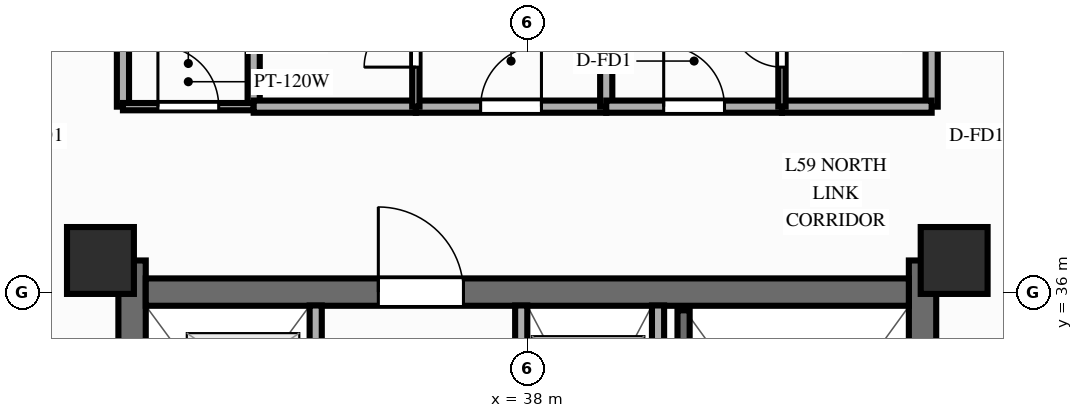
"""IFC4 building model, lengths in metres.
Left out: names, types, materials, properties, quantities, classifications, styles, units other than length and angle.
Written with IfcOpenShell. Run it as: python <this file> out.ifc"""

import sys

from ifc_helpers import new_model, si_unit, direction, frame, frame_2d, origin, origin_2d, place, context, subcontext, project, spatial, rectangle, extrude, source, transform, mapped, element, fill, save


model = new_model("IFC4")
c1 = context("Model", 3, precision=1e-05, world=origin(), true_north=direction((0.0, 1.0)))
c2 = subcontext(c1, "Body", "Model", "MODEL_VIEW")
j1 = project(units=[si_unit("LENGTHUNIT", "METRE"), si_unit("PLANEANGLEUNIT", "RADIAN")], contexts=[c1])
p1 = place(None, origin())
s1 = spatial("IfcSite", under=j1, at=p1, CompositionType="ELEMENT")
p2 = place(p1, origin())
s2 = spatial("IfcBuilding", under=s1, at=p2, CompositionType="ELEMENT")
p3 = place(p2, frame((0.0, 0.0, 189.7)))
s3 = spatial("IfcBuildingStorey", under=s2, at=p3, CompositionType="ELEMENT", Elevation=189.7)
p4 = place(p3, frame((31.5, 17.48, 0.0), z_axis=(0.0, 0.0, 1.0), x_axis=(0.0, 1.0, 0.0)))
e1 = element("IfcWall", 1, at=p4, inside=s3, PredefinedType="SHEAR", context=c2, shape_type="SweptSolid", body=[
    extrude(rectangle(XDim=19.04, YDim=0.45, at=frame_2d((9.52, 0.0))), origin(), (0.0, 0.0, 1.0), 3.0),
])
p5 = place(p4, frame((6.32, 0.0, 0.0)))
e2 = element("IfcOpeningElement", 2, at=p5, cuts=e1, PredefinedType="OPENING", context=c2, shape_type="SweptSolid", body=[
    extrude(rectangle(XDim=1.1, YDim=2.15, at=frame_2d((0.55, 1.075))), frame((0.0, 0.237, 0.0), z_axis=(0.0, -1.0, 0.0), x_axis=(1.0, 0.0, 0.0)), (0.0, 0.0, 1.0), 0.474),
])
p6 = place(p3, frame((44.5, 17.48, 0.0), z_axis=(0.0, 0.0, 1.0), x_axis=(0.0, 1.0, 0.0)))
e3 = element("IfcWall", 3, at=p6, inside=s3, PredefinedType="SHEAR", context=c2, shape_type="SweptSolid", body=[
    extrude(rectangle(XDim=19.04, YDim=0.45, at=frame_2d((9.52, 0.0))), origin(), (0.0, 0.0, 1.0), 3.0),
])
p7 = place(p6, frame((12.67, 0.0, 0.0), z_axis=(0.0, 0.0, 1.0), x_axis=(-1.0, 0.0, 0.0)))
e4 = element("IfcOpeningElement", 4, at=p7, cuts=e3, PredefinedType="OPENING", context=c2, shape_type="SweptSolid", body=[
    extrude(rectangle(XDim=1.1, YDim=2.15, at=frame_2d((0.55, 1.075))), frame((0.0, 0.237, 0.0), z_axis=(0.0, -1.0, 0.0), x_axis=(1.0, 0.0, 0.0)), (0.0, 0.0, 1.0), 0.474),
])
p8 = place(p3, frame((31.725, 36.0, 0.0), z_axis=(0.0, 0.0, 1.0), x_axis=(1.0, 0.0, 0.0)))
e5 = element("IfcWall", 5, at=p8, inside=s3, PredefinedType="SHEAR", context=c2, shape_type="SweptSolid", body=[
    extrude(rectangle(XDim=12.55, YDim=0.45, at=frame_2d((6.275, 0.0))), origin(), (0.0, 0.0, 1.0), 3.0),
])
p9 = place(p8, frame((5.225, 0.0, 0.0), z_axis=(0.0, 0.0, 1.0), x_axis=(-1.0, 0.0, 0.0)))
e6 = element("IfcOpeningElement", 6, at=p9, cuts=e5, PredefinedType="OPENING", context=c2, shape_type="SweptSolid", body=[
    extrude(rectangle(XDim=1.4, YDim=2.15, at=frame_2d((0.7, 1.075))), frame((0.0, 0.237, 0.0), z_axis=(0.0, -1.0, 0.0), x_axis=(1.0, 0.0, 0.0)), (0.0, 0.0, 1.0), 0.474),
])
m1 = source(origin(), c2, "Body", "SweptSolid", [
    extrude(rectangle(XDim=1.1, YDim=1.1, at=origin_2d()), origin(), (0.0, 0.0, 1.0), 3.0),
])
for number, where, z_axis, x_axis in (
    (7, (30.98, 36.52, 0.0), (0.0, 0.0, 1.0), (1.0, 0.0, 0.0)),
    (8, (45.02, 36.52, 0.0), (0.0, 0.0, 1.0), (1.0, 0.0, 0.0)),
):
    element("IfcColumn", number, at=place(p3, frame(where, z_axis=z_axis, x_axis=x_axis)), inside=s3, PredefinedType="COLUMN", context=c2, shape_type="MappedRepresentation", body=[
        mapped(m1, transform((0.0, 0.0, 0.0), scale=1.0)),
    ])
p10 = place(p3, frame((40.15, 31.8, 0.0), z_axis=(0.0, 0.0, 1.0), x_axis=(0.0, 1.0, 0.0)))
e9 = element("IfcWall", 9, at=p10, inside=s3, PredefinedType="PARTITIONING", context=c2, shape_type="SweptSolid", body=[
    extrude(rectangle(XDim=3.98, YDim=0.2, at=frame_2d((1.99, 0.0))), origin(), (0.0, 0.0, 1.0), 2.79),
])
p11 = place(p3, frame((40.57, 28.65, 0.0), z_axis=(0.0, 0.0, 1.0), x_axis=(0.0, 1.0, 0.0)))
e10 = element("IfcWall", 10, at=p11, inside=s3, PredefinedType="SOLIDWALL", context=c2, shape_type="SweptSolid", body=[
    extrude(rectangle(XDim=7.05, YDim=0.2, at=frame_2d((3.525, 0.0))), origin(), (0.0, 0.0, 1.0), 2.79),
])
p12 = place(p3, frame((34.52, 25.44, 0.0), z_axis=(0.0, 0.0, 1.0), x_axis=(0.0, 1.0, 0.0)))
e11 = element("IfcWall", 11, at=p12, inside=s3, PredefinedType="PARTITIONING", context=c2, shape_type="SweptSolid", body=[
    extrude(rectangle(XDim=10.34, YDim=0.2, at=frame_2d((5.17, 0.0))), origin(), (0.0, 0.0, 1.0), 2.79),
])
p13 = place(p12, frame((2.6, 0.0, 0.0)))
e12 = element("IfcOpeningElement", 12, at=p13, cuts=e11, PredefinedType="OPENING", context=c2, shape_type="SweptSolid", body=[
    extrude(rectangle(XDim=0.9, YDim=2.1, at=frame_2d((0.45, 1.05))), frame((0.0, 0.112, 0.0), z_axis=(0.0, -1.0, 0.0), x_axis=(1.0, 0.0, 0.0)), (0.0, 0.0, 1.0), 0.224),
])
p14 = place(p12, frame((7.01, 0.0, 0.0)))
e13 = element("IfcOpeningElement", 13, at=p14, cuts=e11, PredefinedType="OPENING", context=c2, shape_type="SweptSolid", body=[
    extrude(rectangle(XDim=1.0, YDim=2.15, at=frame_2d((0.5, 1.075))), frame((0.0, 0.112, 0.0), z_axis=(0.0, -1.0, 0.0), x_axis=(1.0, 0.0, 0.0)), (0.0, 0.0, 1.0), 0.224),
])
p15 = place(p12, frame((8.76, 0.0, 0.0)))
e14 = element("IfcOpeningElement", 14, at=p15, cuts=e11, PredefinedType="OPENING", context=c2, shape_type="SweptSolid", body=[
    extrude(rectangle(XDim=1.0, YDim=2.15, at=frame_2d((0.5, 1.075))), frame((0.0, 0.112, 0.0), z_axis=(0.0, -1.0, 0.0), x_axis=(1.0, 0.0, 0.0)), (0.0, 0.0, 1.0), 0.224),
])
p16 = place(p3, frame((37.9, 25.44, 0.0), z_axis=(0.0, 0.0, 1.0), x_axis=(0.0, 1.0, 0.0)))
e15 = element("IfcWall", 15, at=p16, inside=s3, PredefinedType="PARTITIONING", context=c2, shape_type="SweptSolid", body=[
    extrude(rectangle(XDim=10.34, YDim=0.2, at=frame_2d((5.17, 0.0))), origin(), (0.0, 0.0, 1.0), 2.79),
])
p17 = place(p16, frame((2.6, 0.0, 0.0)))
e16 = element("IfcOpeningElement", 16, at=p17, cuts=e15, PredefinedType="OPENING", context=c2, shape_type="SweptSolid", body=[
    extrude(rectangle(XDim=0.9, YDim=2.1, at=frame_2d((0.45, 1.05))), frame((0.0, 0.112, 0.0), z_axis=(0.0, -1.0, 0.0), x_axis=(1.0, 0.0, 0.0)), (0.0, 0.0, 1.0), 0.224),
])
p18 = place(p16, frame((6.86, 0.0, 0.0)))
e17 = element("IfcOpeningElement", 17, at=p18, cuts=e15, PredefinedType="OPENING", context=c2, shape_type="SweptSolid", body=[
    extrude(rectangle(XDim=1.0, YDim=2.15, at=frame_2d((0.5, 1.075))), frame((0.0, 0.112, 0.0), z_axis=(0.0, -1.0, 0.0), x_axis=(1.0, 0.0, 0.0)), (0.0, 0.0, 1.0), 0.224),
])
p19 = place(p16, frame((8.71, 0.0, 0.0)))
e18 = element("IfcOpeningElement", 18, at=p19, cuts=e15, PredefinedType="OPENING", context=c2, shape_type="SweptSolid", body=[
    extrude(rectangle(XDim=1.0, YDim=2.15, at=frame_2d((0.5, 1.075))), frame((0.0, 0.112, 0.0), z_axis=(0.0, -1.0, 0.0), x_axis=(1.0, 0.0, 0.0)), (0.0, 0.0, 1.0), 0.224),
])
for number, where, z_axis, x_axis in (
    (19, (31.35, 39.05, 0.0), (0.0, 0.0, 1.0), (0.0, 1.0, 0.0)),
    (20, (44.65, 39.05, 0.0), (0.0, 0.0, 1.0), (0.0, 1.0, 0.0)),
):
    element("IfcWall", number, at=place(p3, frame(where, z_axis=z_axis, x_axis=x_axis)), inside=s3, PredefinedType="PARTITIONING", context=c2, shape_type="SweptSolid", body=[
        extrude(rectangle(XDim=8.8, YDim=0.2, at=frame_2d((4.4, 0.0))), origin(), (0.0, 0.0, 1.0), 2.39),
    ])
p20 = place(p3, frame((33.5, 39.05, 0.0), z_axis=(0.0, 0.0, 1.0), x_axis=(0.0, 1.0, 0.0)))
e21 = element("IfcWall", 21, at=p20, inside=s3, PredefinedType="PARTITIONING", context=c2, shape_type="SweptSolid", body=[
    extrude(rectangle(XDim=8.8, YDim=0.2, at=frame_2d((4.4, 0.0))), origin(), (0.0, 0.0, 1.0), 2.79),
])
p21 = place(p3, frame((31.35, 39.05, 0.0), z_axis=(0.0, 0.0, 1.0), x_axis=(1.0, 0.0, 0.0)))
e22 = element("IfcWall", 22, at=p21, inside=s3, PredefinedType="PARTITIONING", context=c2, shape_type="SweptSolid", body=[
    extrude(rectangle(XDim=2.15, YDim=0.12, at=frame_2d((1.075, 0.0))), origin(), (0.0, 0.0, 1.0), 2.79),
])
p22 = place(p21, frame((0.575, 0.0, 0.0)))
e23 = element("IfcOpeningElement", 23, at=p22, cuts=e22, PredefinedType="OPENING", context=c2, shape_type="SweptSolid", body=[
    extrude(rectangle(XDim=1.0, YDim=2.1, at=frame_2d((0.5, 1.05))), frame((0.0, 0.072, 0.0), z_axis=(0.0, -1.0, 0.0), x_axis=(1.0, 0.0, 0.0)), (0.0, 0.0, 1.0), 0.144),
])
p23 = place(p3, frame((33.5, 39.05, 0.0), z_axis=(0.0, 0.0, 1.0), x_axis=(1.0, 0.0, 0.0)))
e24 = element("IfcWall", 24, at=p23, inside=s3, PredefinedType="PARTITIONING", context=c2, shape_type="SweptSolid", body=[
    extrude(rectangle(XDim=2.667, YDim=0.2, at=frame_2d((1.333, 0.0))), origin(), (0.0, 0.0, 1.0), 2.79),
])
p24 = place(p3, frame((36.167, 39.05, 0.0), z_axis=(0.0, 0.0, 1.0), x_axis=(1.0, 0.0, 0.0)))
e25 = element("IfcWall", 25, at=p24, inside=s3, PredefinedType="PARTITIONING", context=c2, shape_type="SweptSolid", body=[
    extrude(rectangle(XDim=3.131, YDim=0.2, at=frame_2d((1.565, 0.0))), origin(), (0.0, 0.0, 1.0), 2.79),
])
p25 = place(p24, frame((1.065, 0.0, 0.0)))
e26 = element("IfcOpeningElement", 26, at=p25, cuts=e25, PredefinedType="OPENING", context=c2, shape_type="SweptSolid", body=[
    extrude(rectangle(XDim=1.0, YDim=2.15, at=frame_2d((0.5, 1.075))), frame((0.0, 0.112, 0.0), z_axis=(0.0, -1.0, 0.0), x_axis=(1.0, 0.0, 0.0)), (0.0, 0.0, 1.0), 0.224),
])
p26 = place(p3, frame((36.167, 39.05, 0.0), z_axis=(0.0, 0.0, 1.0), x_axis=(0.0, 1.0, 0.0)))
e27 = element("IfcWall", 27, at=p26, inside=s3, PredefinedType="PARTITIONING", context=c2, shape_type="SweptSolid", body=[
    extrude(rectangle(XDim=2.15, YDim=0.12, at=frame_2d((1.075, 0.0))), origin(), (0.0, 0.0, 1.0), 2.79),
])
p27 = place(p26, frame((0.65, 0.0, 0.0)))
e28 = element("IfcOpeningElement", 28, at=p27, cuts=e27, PredefinedType="OPENING", context=c2, shape_type="SweptSolid", body=[
    extrude(rectangle(XDim=0.85, YDim=2.05, at=frame_2d((0.425, 1.025))), frame((0.0, 0.072, 0.0), z_axis=(0.0, -1.0, 0.0), x_axis=(1.0, 0.0, 0.0)), (0.0, 0.0, 1.0), 0.144),
])
p28 = place(p3, frame((39.298, 39.05, 0.0), z_axis=(0.0, 0.0, 1.0), x_axis=(0.0, 1.0, 0.0)))
e29 = element("IfcWall", 29, at=p28, inside=s3, PredefinedType="PARTITIONING", context=c2, shape_type="SweptSolid", body=[
    extrude(rectangle(XDim=8.8, YDim=0.2, at=frame_2d((4.4, 0.0))), origin(), (0.0, 0.0, 1.0), 2.79),
])
p29 = place(p3, frame((39.298, 39.05, 0.0), z_axis=(0.0, 0.0, 1.0), x_axis=(1.0, 0.0, 0.0)))
e30 = element("IfcWall", 30, at=p29, inside=s3, PredefinedType="PARTITIONING", context=c2, shape_type="SweptSolid", body=[
    extrude(rectangle(XDim=2.89, YDim=0.2, at=frame_2d((1.445, 0.0))), origin(), (0.0, 0.0, 1.0), 2.79),
])
p30 = place(p29, frame((0.945, 0.0, 0.0)))
e31 = element("IfcOpeningElement", 31, at=p30, cuts=e30, PredefinedType="OPENING", context=c2, shape_type="SweptSolid", body=[
    extrude(rectangle(XDim=1.0, YDim=2.15, at=frame_2d((0.5, 1.075))), frame((0.0, 0.112, 0.0), z_axis=(0.0, -1.0, 0.0), x_axis=(1.0, 0.0, 0.0)), (0.0, 0.0, 1.0), 0.224),
])
p31 = place(p3, frame((42.188, 39.05, 0.0), z_axis=(0.0, 0.0, 1.0), x_axis=(1.0, 0.0, 0.0)))
e32 = element("IfcWall", 32, at=p31, inside=s3, PredefinedType="PARTITIONING", context=c2, shape_type="SweptSolid", body=[
    extrude(rectangle(XDim=2.462, YDim=0.2, at=frame_2d((1.231, 0.0))), origin(), (0.0, 0.0, 1.0), 2.79),
])
p32 = place(p3, frame((42.188, 39.05, 0.0), z_axis=(0.0, 0.0, 1.0), x_axis=(0.0, 1.0, 0.0)))
e33 = element("IfcWall", 33, at=p32, inside=s3, PredefinedType="PARTITIONING", context=c2, shape_type="SweptSolid", body=[
    extrude(rectangle(XDim=2.15, YDim=0.12, at=frame_2d((1.075, 0.0))), origin(), (0.0, 0.0, 1.0), 2.79),
])
p33 = place(p32, frame((0.65, 0.0, 0.0)))
e34 = element("IfcOpeningElement", 34, at=p33, cuts=e33, PredefinedType="OPENING", context=c2, shape_type="SweptSolid", body=[
    extrude(rectangle(XDim=0.85, YDim=2.05, at=frame_2d((0.425, 1.025))), frame((0.0, 0.072, 0.0), z_axis=(0.0, -1.0, 0.0), x_axis=(1.0, 0.0, 0.0)), (0.0, 0.0, 1.0), 0.144),
])
m2 = source(origin(), c2, "Body", "SweptSolid", [
    extrude(rectangle(XDim=1.4, YDim=2.15, at=frame_2d((0.7, 1.075))), frame((0.0, 0.025, 0.0), z_axis=(0.0, -1.0, 0.0), x_axis=(1.0, 0.0, 0.0)), (0.0, 0.0, 1.0), 0.05),
])
p34 = place(p9, origin())
e35 = element("IfcDoor", 35, at=p34, inside=s3, OperationType="SINGLE_SWING_RIGHT", PredefinedType="DOOR", context=c2, shape_type="MappedRepresentation", body=[
    mapped(m2, transform((0.0, 0.0, 0.0), scale=1.0)),
])
fill(e6, e35)
m3 = source(origin(), c2, "Body", "SweptSolid", [
    extrude(rectangle(XDim=1.0, YDim=2.1, at=frame_2d((0.5, 1.05))), frame((0.0, 0.025, 0.0), z_axis=(0.0, -1.0, 0.0), x_axis=(1.0, 0.0, 0.0)), (0.0, 0.0, 1.0), 0.05),
])
p35 = place(p22, origin())
e36 = element("IfcDoor", 36, at=p35, inside=s3, OperationType="SINGLE_SWING_LEFT", PredefinedType="DOOR", context=c2, shape_type="MappedRepresentation", body=[
    mapped(m3, transform((0.0, 0.0, 0.0), scale=1.0)),
])
fill(e23, e36)
m4 = source(origin(), c2, "Body", "SweptSolid", [
    extrude(rectangle(XDim=1.0, YDim=2.15, at=frame_2d((0.5, 1.075))), frame((0.0, 0.025, 0.0), z_axis=(0.0, -1.0, 0.0), x_axis=(1.0, 0.0, 0.0)), (0.0, 0.0, 1.0), 0.05),
])
p36 = place(p25, origin())
e37 = element("IfcDoor", 37, at=p36, inside=s3, OperationType="SINGLE_SWING_RIGHT", PredefinedType="DOOR", context=c2, shape_type="MappedRepresentation", body=[
    mapped(m4, transform((0.0, 0.0, 0.0), scale=1.0)),
])
fill(e26, e37)
m5 = source(origin(), c2, "Body", "SweptSolid", [
    extrude(rectangle(XDim=0.85, YDim=2.05, at=frame_2d((0.425, 1.025))), frame((0.0, 0.025, 0.0), z_axis=(0.0, -1.0, 0.0), x_axis=(1.0, 0.0, 0.0)), (0.0, 0.0, 1.0), 0.05),
])
p37 = place(p27, origin())
e38 = element("IfcDoor", 38, at=p37, inside=s3, OperationType="SINGLE_SWING_LEFT", PredefinedType="DOOR", context=c2, shape_type="MappedRepresentation", body=[
    mapped(m5, transform((0.0, 0.0, 0.0), scale=1.0)),
])
fill(e28, e38)
p38 = place(p30, origin())
e39 = element("IfcDoor", 39, at=p38, inside=s3, OperationType="SINGLE_SWING_LEFT", PredefinedType="DOOR", context=c2, shape_type="MappedRepresentation", body=[
    mapped(m4, transform((0.0, 0.0, 0.0), scale=1.0)),
])
fill(e31, e39)
p39 = place(p33, origin())
e40 = element("IfcDoor", 40, at=p39, inside=s3, OperationType="SINGLE_SWING_RIGHT", PredefinedType="DOOR", context=c2, shape_type="MappedRepresentation", body=[
    mapped(m5, transform((0.0, 0.0, 0.0), scale=1.0)),
])
fill(e34, e40)
save(model, sys.argv[1])
